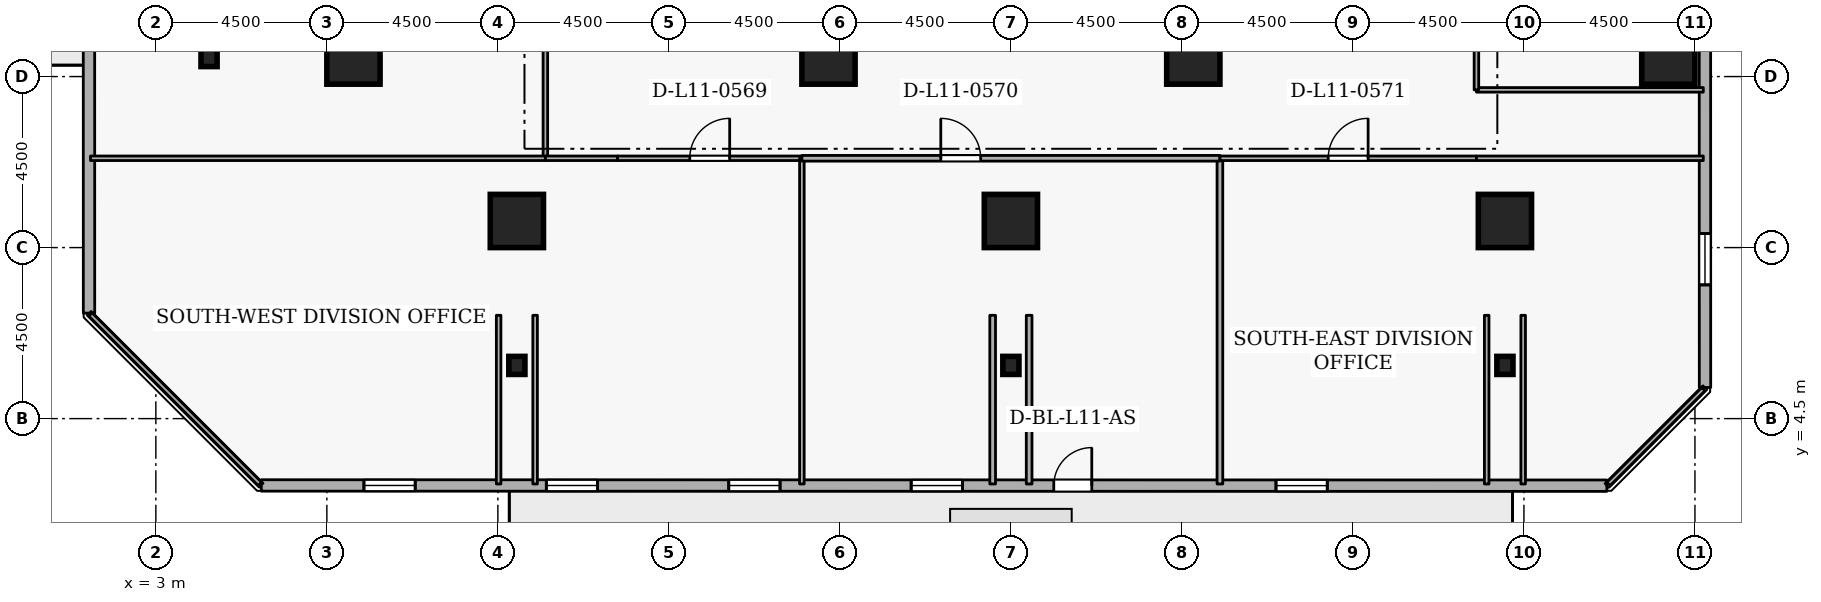
"""IFC4 building model, lengths in metres.
Left out: names, types, materials, properties, quantities, classifications, styles, units other than length and angle.
Written with IfcOpenShell. Run it as: python <this file> out.ifc"""

import sys

from ifc_helpers import new_model, si_unit, direction, frame, frame_2d, origin, origin_2d, place, context, subcontext, project, spatial, rectangle, i_section, extrude, element, fill, save


model = new_model("IFC4")
c1 = context("Model", 3, precision=1e-05, world=origin(), true_north=direction((0.0, 1.0)))
c2 = subcontext(c1, "Body", "Model", "MODEL_VIEW")
j1 = project(units=[si_unit("LENGTHUNIT", "METRE"), si_unit("PLANEANGLEUNIT", "RADIAN")], contexts=[c1])
p1 = place(None, origin())
s1 = spatial("IfcSite", under=j1, at=p1, CompositionType="ELEMENT")
p2 = place(p1, origin())
s2 = spatial("IfcBuilding", under=s1, at=p2, CompositionType="ELEMENT")
p3 = place(p2, frame((0.0, 0.0, 45.9)))
s3 = spatial("IfcBuildingStorey", under=s2, at=p3, CompositionType="ELEMENT", Elevation=45.9)
for number, where, z_axis, x_axis in (
    (1, (12.5, 9.7, 0.0), (0.0, 0.0, 1.0), (1.0, 0.0, 0.0)),
    (2, (25.5, 9.7, 0.0), (0.0, 0.0, 1.0), (1.0, 0.0, 0.0)),
    (3, (38.5, 9.7, 0.0), (0.0, 0.0, 1.0), (1.0, 0.0, 0.0)),
    (4, (42.8, 14.0, 0.0), (0.0, 0.0, 1.0), (1.0, 0.0, 0.0)),
    (5, (8.2, 14.0, 0.0), (0.0, 0.0, 1.0), (1.0, 0.0, 0.0)),
    (6, (20.7, 14.0, 0.0), (0.0, 0.0, 1.0), (1.0, 0.0, 0.0)),
    (7, (30.3, 14.0, 0.0), (0.0, 0.0, 1.0), (1.0, 0.0, 0.0)),
):
    element("IfcColumn", number, at=place(p3, frame(where, z_axis=z_axis, x_axis=x_axis)), inside=s3, PredefinedType="COLUMN", context=c2, shape_type="SweptSolid", body=[
        extrude(rectangle(XDim=1.4, YDim=1.4, at=origin_2d()), origin(), (0.0, 0.0, 1.0), 3.6),
    ])
for number, where, z_axis, x_axis in (
    (8, (12.5, 5.9, 0.0), (0.0, 0.0, 1.0), (1.0, 0.0, 0.0)),
    (9, (25.5, 5.9, 0.0), (0.0, 0.0, 1.0), (1.0, 0.0, 0.0)),
    (10, (38.5, 5.9, 0.0), (0.0, 0.0, 1.0), (1.0, 0.0, 0.0)),
    (11, (4.4, 14.0, 0.0), (0.0, 0.0, 1.0), (1.0, 0.0, 0.0)),
):
    element("IfcColumn", number, at=place(p3, frame(where, z_axis=z_axis, x_axis=x_axis)), inside=s3, PredefinedType="COLUMN", context=c2, shape_type="SweptSolid", body=[
        extrude(i_section(OverallWidth=0.424, OverallDepth=0.475, WebThickness=0.048, FlangeThickness=0.077, FilletRadius=0.015, at=origin_2d()), origin(), (0.0, 0.0, 1.0), 3.6),
    ])
p4 = place(p3, frame((5.775, 2.741, 0.0), z_axis=(0.0, 0.0, 1.0), x_axis=(0.999999983929, -0.00017928314, 0.0)))
e12 = element("IfcWall", 12, at=p4, inside=s3, PredefinedType="STANDARD", context=c2, shape_type="SweptSolid", body=[
    extrude(rectangle(XDim=35.406, YDim=0.3, at=frame_2d((17.703, 0.0))), origin(), (0.0, 0.0, 1.0), 2.22),
])
p5 = place(p4, frame((20.853, 0.0, 0.0)))
e13 = element("IfcOpeningElement", 13, at=p5, cuts=e12, PredefinedType="OPENING", context=c2, shape_type="SweptSolid", body=[
    extrude(rectangle(XDim=1.0, YDim=2.08, at=frame_2d((0.5, 1.04))), frame((0.0, 0.16, 0.0), z_axis=(0.0, -1.0, 0.0), x_axis=(1.0, 0.0, 0.0)), (0.0, 0.0, 1.0), 0.32),
])
p6 = place(p4, frame((2.7, 0.0, 0.72)))
e14 = element("IfcOpeningElement", 14, at=p6, cuts=e12, PredefinedType="OPENING", context=c2, shape_type="SweptSolid", body=[
    extrude(rectangle(XDim=1.35, YDim=1.05, at=frame_2d((0.675, 0.525))), frame((0.0, 0.16, 0.0), z_axis=(0.0, -1.0, 0.0), x_axis=(1.0, 0.0, 0.0)), (0.0, 0.0, 1.0), 0.32),
])
p7 = place(p4, frame((7.5, 0.0, 0.72)))
e15 = element("IfcOpeningElement", 15, at=p7, cuts=e12, PredefinedType="OPENING", context=c2, shape_type="SweptSolid", body=[
    extrude(rectangle(XDim=1.35, YDim=1.05, at=frame_2d((0.675, 0.525))), frame((0.0, 0.16, 0.0), z_axis=(0.0, -1.0, 0.0), x_axis=(1.0, 0.0, 0.0)), (0.0, 0.0, 1.0), 0.32),
])
p8 = place(p4, frame((12.3, 0.0, 0.72)))
e16 = element("IfcOpeningElement", 16, at=p8, cuts=e12, PredefinedType="OPENING", context=c2, shape_type="SweptSolid", body=[
    extrude(rectangle(XDim=1.35, YDim=1.05, at=frame_2d((0.675, 0.525))), frame((0.0, 0.16, 0.0), z_axis=(0.0, -1.0, 0.0), x_axis=(1.0, 0.0, 0.0)), (0.0, 0.0, 1.0), 0.32),
])
p9 = place(p4, frame((17.1, 0.0, 0.72)))
e17 = element("IfcOpeningElement", 17, at=p9, cuts=e12, PredefinedType="OPENING", context=c2, shape_type="SweptSolid", body=[
    extrude(rectangle(XDim=1.35, YDim=1.05, at=frame_2d((0.675, 0.525))), frame((0.0, 0.16, 0.0), z_axis=(0.0, -1.0, 0.0), x_axis=(1.0, 0.0, 0.0)), (0.0, 0.0, 1.0), 0.32),
])
p10 = place(p4, frame((26.7, 0.0, 0.72)))
e18 = element("IfcOpeningElement", 18, at=p10, cuts=e12, PredefinedType="OPENING", context=c2, shape_type="SweptSolid", body=[
    extrude(rectangle(XDim=1.35, YDim=1.05, at=frame_2d((0.675, 0.525))), frame((0.0, 0.16, 0.0), z_axis=(0.0, -1.0, 0.0), x_axis=(1.0, 0.0, 0.0)), (0.0, 0.0, 1.0), 0.32),
])
p11 = place(p3, frame((43.765, 5.319, 0.0), z_axis=(0.0, 0.0, 1.0), x_axis=(-0.00017928314, 0.999999983929, 0.0)))
e19 = element("IfcWall", 19, at=p11, inside=s3, PredefinedType="STANDARD", context=c2, shape_type="SweptSolid", body=[
    extrude(rectangle(XDim=35.406, YDim=0.3, at=frame_2d((17.703, 0.0))), origin(), (0.0, 0.0, 1.0), 2.22),
])
p12 = place(p11, frame((2.7, 0.0, 0.72)))
e20 = element("IfcOpeningElement", 20, at=p12, cuts=e19, PredefinedType="OPENING", context=c2, shape_type="SweptSolid", body=[
    extrude(rectangle(XDim=1.35, YDim=1.05, at=frame_2d((0.675, 0.525))), frame((0.0, 0.16, 0.0), z_axis=(0.0, -1.0, 0.0), x_axis=(1.0, 0.0, 0.0)), (0.0, 0.0, 1.0), 0.32),
])
p13 = place(p11, frame((12.3, 0.0, 0.72)))
e21 = element("IfcOpeningElement", 21, at=p13, cuts=e19, PredefinedType="OPENING", context=c2, shape_type="SweptSolid", body=[
    extrude(rectangle(XDim=1.35, YDim=1.05, at=frame_2d((0.675, 0.525))), frame((0.0, 0.16, 0.0), z_axis=(0.0, -1.0, 0.0), x_axis=(1.0, 0.0, 0.0)), (0.0, 0.0, 1.0), 0.32),
])
p14 = place(p11, frame((17.1, 0.0, 0.72)))
e22 = element("IfcOpeningElement", 22, at=p14, cuts=e19, PredefinedType="OPENING", context=c2, shape_type="SweptSolid", body=[
    extrude(rectangle(XDim=1.35, YDim=1.05, at=frame_2d((0.675, 0.525))), frame((0.0, 0.16, 0.0), z_axis=(0.0, -1.0, 0.0), x_axis=(1.0, 0.0, 0.0)), (0.0, 0.0, 1.0), 0.32),
])
p15 = place(p11, frame((26.7, 0.0, 0.72)))
e23 = element("IfcOpeningElement", 23, at=p15, cuts=e19, PredefinedType="OPENING", context=c2, shape_type="SweptSolid", body=[
    extrude(rectangle(XDim=1.35, YDim=1.05, at=frame_2d((0.675, 0.525))), frame((0.0, 0.16, 0.0), z_axis=(0.0, -1.0, 0.0), x_axis=(1.0, 0.0, 0.0)), (0.0, 0.0, 1.0), 0.32),
])
p16 = place(p11, frame((31.5, 0.0, 0.72)))
e24 = element("IfcOpeningElement", 24, at=p16, cuts=e19, PredefinedType="OPENING", context=c2, shape_type="SweptSolid", body=[
    extrude(rectangle(XDim=1.35, YDim=1.05, at=frame_2d((0.675, 0.525))), frame((0.0, 0.16, 0.0), z_axis=(0.0, -1.0, 0.0), x_axis=(1.0, 0.0, 0.0)), (0.0, 0.0, 1.0), 0.32),
])
p17 = place(p3, frame((1.235, 42.681, 0.0), z_axis=(0.0, 0.0, 1.0), x_axis=(0.00017928314, -0.999999983929, 0.0)))
e25 = element("IfcWall", 25, at=p17, inside=s3, PredefinedType="STANDARD", context=c2, shape_type="SweptSolid", body=[
    extrude(rectangle(XDim=35.406, YDim=0.3, at=frame_2d((17.703, 0.0))), origin(), (0.0, 0.0, 1.0), 2.22),
])
p18 = place(p17, frame((19.503, 0.0, 0.0)))
e26 = element("IfcOpeningElement", 26, at=p18, cuts=e25, PredefinedType="OPENING", context=c2, shape_type="SweptSolid", body=[
    extrude(rectangle(XDim=1.0, YDim=2.08, at=frame_2d((0.5, 1.04))), frame((0.0, 0.16, 0.0), z_axis=(0.0, -1.0, 0.0), x_axis=(1.0, 0.0, 0.0)), (0.0, 0.0, 1.0), 0.32),
])
p19 = place(p17, frame((2.7, 0.0, 0.72)))
e27 = element("IfcOpeningElement", 27, at=p19, cuts=e25, PredefinedType="OPENING", context=c2, shape_type="SweptSolid", body=[
    extrude(rectangle(XDim=1.35, YDim=1.05, at=frame_2d((0.675, 0.525))), frame((0.0, 0.16, 0.0), z_axis=(0.0, -1.0, 0.0), x_axis=(1.0, 0.0, 0.0)), (0.0, 0.0, 1.0), 0.32),
])
p20 = place(p17, frame((7.5, 0.0, 0.72)))
e28 = element("IfcOpeningElement", 28, at=p20, cuts=e25, PredefinedType="OPENING", context=c2, shape_type="SweptSolid", body=[
    extrude(rectangle(XDim=1.35, YDim=1.05, at=frame_2d((0.675, 0.525))), frame((0.0, 0.16, 0.0), z_axis=(0.0, -1.0, 0.0), x_axis=(1.0, 0.0, 0.0)), (0.0, 0.0, 1.0), 0.32),
])
p21 = place(p17, frame((17.1, 0.0, 0.72)))
e29 = element("IfcOpeningElement", 29, at=p21, cuts=e25, PredefinedType="OPENING", context=c2, shape_type="SweptSolid", body=[
    extrude(rectangle(XDim=1.35, YDim=1.05, at=frame_2d((0.675, 0.525))), frame((0.0, 0.16, 0.0), z_axis=(0.0, -1.0, 0.0), x_axis=(1.0, 0.0, 0.0)), (0.0, 0.0, 1.0), 0.32),
])
p22 = place(p17, frame((21.9, 0.0, 0.72)))
e30 = element("IfcOpeningElement", 30, at=p22, cuts=e25, PredefinedType="OPENING", context=c2, shape_type="SweptSolid", body=[
    extrude(rectangle(XDim=1.35, YDim=1.05, at=frame_2d((0.675, 0.525))), frame((0.0, 0.16, 0.0), z_axis=(0.0, -1.0, 0.0), x_axis=(1.0, 0.0, 0.0)), (0.0, 0.0, 1.0), 0.32),
])
p23 = place(p17, frame((26.7, 0.0, 0.72)))
e31 = element("IfcOpeningElement", 31, at=p23, cuts=e25, PredefinedType="OPENING", context=c2, shape_type="SweptSolid", body=[
    extrude(rectangle(XDim=1.35, YDim=1.05, at=frame_2d((0.675, 0.525))), frame((0.0, 0.16, 0.0), z_axis=(0.0, -1.0, 0.0), x_axis=(1.0, 0.0, 0.0)), (0.0, 0.0, 1.0), 0.32),
])
p24 = place(p3, frame((13.25, 20.7, 0.0), z_axis=(0.0, 0.0, 1.0), x_axis=(0.0, -1.0, 0.0)))
e32 = element("IfcWall", 32, at=p24, inside=s3, PredefinedType="PARTITIONING", context=c2, shape_type="SweptSolid", body=[
    extrude(rectangle(XDim=9.35, YDim=0.12, at=frame_2d((4.675, 0.0))), origin(), (0.0, 0.0, 1.0), 3.26),
])
p25 = place(p24, frame((4.15, 0.0, 0.0)))
e33 = element("IfcOpeningElement", 33, at=p25, cuts=e32, PredefinedType="OPENING", context=c2, shape_type="SweptSolid", body=[
    extrude(rectangle(XDim=1.05, YDim=2.1, at=frame_2d((0.525, 1.05))), frame((0.0, 0.07, 0.0), z_axis=(0.0, -1.0, 0.0), x_axis=(1.0, 0.0, 0.0)), (0.0, 0.0, 1.0), 0.14),
])
p26 = place(p3, frame((13.25, 11.35, 0.0), z_axis=(0.0, 0.0, 1.0), x_axis=(-1.0, 0.0, 0.0)))
e34 = element("IfcWall", 34, at=p26, inside=s3, PredefinedType="PARTITIONING", context=c2, shape_type="SweptSolid", body=[
    extrude(rectangle(XDim=11.97, YDim=0.12, at=frame_2d((5.985, 0.0))), origin(), (0.0, 0.0, 1.0), 3.26),
])
p27 = place(p3, frame((43.72, 13.15, 0.0), z_axis=(0.0, 0.0, 1.0), x_axis=(-1.0, 0.0, 0.0)))
e35 = element("IfcWall", 35, at=p27, inside=s3, PredefinedType="PARTITIONING", context=c2, shape_type="SweptSolid", body=[
    extrude(rectangle(XDim=5.97, YDim=0.12, at=frame_2d((2.985, 0.0))), origin(), (0.0, 0.0, 1.0), 3.26),
])
p28 = place(p3, frame((37.75, 13.15, 0.0), z_axis=(0.0, 0.0, 1.0), x_axis=(0.0, 1.0, 0.0)))
e36 = element("IfcWall", 36, at=p28, inside=s3, PredefinedType="PARTITIONING", context=c2, shape_type="SweptSolid", body=[
    extrude(rectangle(XDim=1.862, YDim=0.12, at=frame_2d((0.931, 0.0))), origin(), (0.0, 0.0, 1.0), 3.26),
])
for number, where, z_axis, x_axis in (
    (37, (12.98, 2.78, 0.0), (0.0, 0.0, 1.0), (0.0, 1.0, 0.0)),
    (38, (12.02, 7.219, 0.0), (0.0, 0.0, 1.0), (0.0, -1.0, 0.0)),
):
    element("IfcWall", number, at=place(p3, frame(where, z_axis=z_axis, x_axis=x_axis)), inside=s3, PredefinedType="PARTITIONING", context=c2, shape_type="SweptSolid", body=[
        extrude(rectangle(XDim=4.438, YDim=0.12, at=frame_2d((2.219, 0.0))), origin(), (0.0, 0.0, 1.0), 1.685),
    ])
p29 = place(p3, frame((5.739, 2.78, 0.0), z_axis=(0.0, 0.0, 1.0), x_axis=(-0.707106781187, 0.707106781187, 0.0)))
e39 = element("IfcWall", 39, at=p29, inside=s3, PredefinedType="PARTITIONING", context=c2, shape_type="SweptSolid", body=[
    extrude(rectangle(XDim=6.305, YDim=0.12, at=frame_2d((3.153, 0.0))), origin(), (0.0, 0.0, 1.0), 3.26),
])
p30 = place(p3, frame((13.25, 11.35, 0.0), z_axis=(0.0, 0.0, 1.0), x_axis=(1.0, 0.0, 0.0)))
e40 = element("IfcWall", 40, at=p30, inside=s3, PredefinedType="PARTITIONING", context=c2, shape_type="SweptSolid", body=[
    extrude(rectangle(XDim=1.9, YDim=0.12, at=frame_2d((0.95, 0.0))), origin(), (0.0, 0.0, 1.0), 3.26),
])
p31 = place(p3, frame((15.15, 11.35, 0.0), z_axis=(0.0, 0.0, 1.0), x_axis=(1.0, 0.0, 0.0)))
e41 = element("IfcWall", 41, at=p31, inside=s3, PredefinedType="PARTITIONING", context=c2, shape_type="SweptSolid", body=[
    extrude(rectangle(XDim=4.85, YDim=0.12, at=frame_2d((2.425, 0.0))), origin(), (0.0, 0.0, 1.0), 3.26),
])
p32 = place(p31, frame((1.9, 0.0, 0.0)))
e42 = element("IfcOpeningElement", 42, at=p32, cuts=e41, PredefinedType="OPENING", context=c2, shape_type="SweptSolid", body=[
    extrude(rectangle(XDim=1.05, YDim=2.1, at=frame_2d((0.525, 1.05))), frame((0.0, 0.07, 0.0), z_axis=(0.0, -1.0, 0.0), x_axis=(1.0, 0.0, 0.0)), (0.0, 0.0, 1.0), 0.14),
])
p33 = place(p3, frame((20.0, 11.35, 0.0), z_axis=(0.0, 0.0, 1.0), x_axis=(0.0, -1.0, 0.0)))
e43 = element("IfcWall", 43, at=p33, inside=s3, PredefinedType="PARTITIONING", context=c2, shape_type="SweptSolid", body=[
    extrude(rectangle(XDim=8.57, YDim=0.12, at=frame_2d((4.285, 0.0))), origin(), (0.0, 0.0, 1.0), 3.26),
])
p34 = place(p3, frame((31.0, 11.35, 0.0), z_axis=(0.0, 0.0, 1.0), x_axis=(0.0, -1.0, 0.0)))
e44 = element("IfcWall", 44, at=p34, inside=s3, PredefinedType="PARTITIONING", context=c2, shape_type="SweptSolid", body=[
    extrude(rectangle(XDim=8.57, YDim=0.15, at=frame_2d((4.285, 0.0))), origin(), (0.0, 0.0, 1.0), 3.26),
])
for number, where, z_axis, x_axis in (
    (45, (25.98, 2.78, 0.0), (0.0, 0.0, 1.0), (0.0, 1.0, 0.0)),
    (46, (25.02, 7.219, 0.0), (0.0, 0.0, 1.0), (0.0, -1.0, 0.0)),
):
    element("IfcWall", number, at=place(p3, frame(where, z_axis=z_axis, x_axis=x_axis)), inside=s3, PredefinedType="PARTITIONING", context=c2, shape_type="SweptSolid", body=[
        extrude(rectangle(XDim=4.438, YDim=0.15, at=frame_2d((2.219, 0.0))), origin(), (0.0, 0.0, 1.0), 1.685),
    ])
p35 = place(p3, frame((20.0, 11.35, 0.0), z_axis=(0.0, 0.0, 1.0), x_axis=(1.0, 0.0, 0.0)))
e47 = element("IfcWall", 47, at=p35, inside=s3, PredefinedType="PARTITIONING", context=c2, shape_type="SweptSolid", body=[
    extrude(rectangle(XDim=11.0, YDim=0.15, at=frame_2d((5.5, 0.0))), origin(), (0.0, 0.0, 1.0), 3.26),
])
p36 = place(p35, frame((3.655, 0.0, 0.0)))
e48 = element("IfcOpeningElement", 48, at=p36, cuts=e47, PredefinedType="OPENING", context=c2, shape_type="SweptSolid", body=[
    extrude(rectangle(XDim=1.05, YDim=2.1, at=frame_2d((0.525, 1.05))), frame((0.0, 0.085, 0.0), z_axis=(0.0, -1.0, 0.0), x_axis=(1.0, 0.0, 0.0)), (0.0, 0.0, 1.0), 0.17),
])
for number, where, z_axis, x_axis in (
    (49, (38.98, 2.78, 0.0), (0.0, 0.0, 1.0), (0.0, 1.0, 0.0)),
    (50, (38.02, 7.219, 0.0), (0.0, 0.0, 1.0), (0.0, -1.0, 0.0)),
):
    element("IfcWall", number, at=place(p3, frame(where, z_axis=z_axis, x_axis=x_axis)), inside=s3, PredefinedType="PARTITIONING", context=c2, shape_type="SweptSolid", body=[
        extrude(rectangle(XDim=4.438, YDim=0.12, at=frame_2d((2.219, 0.0))), origin(), (0.0, 0.0, 1.0), 1.685),
    ])
p37 = place(p3, frame((31.0, 11.35, 0.0), z_axis=(0.0, 0.0, 1.0), x_axis=(1.0, 0.0, 0.0)))
e51 = element("IfcWall", 51, at=p37, inside=s3, PredefinedType="PARTITIONING", context=c2, shape_type="SweptSolid", body=[
    extrude(rectangle(XDim=6.75, YDim=0.12, at=frame_2d((3.375, 0.0))), origin(), (0.0, 0.0, 1.0), 3.26),
])
p38 = place(p37, frame((2.85, 0.0, 0.0)))
e52 = element("IfcOpeningElement", 52, at=p38, cuts=e51, PredefinedType="OPENING", context=c2, shape_type="SweptSolid", body=[
    extrude(rectangle(XDim=1.05, YDim=2.1, at=frame_2d((0.525, 1.05))), frame((0.0, 0.07, 0.0), z_axis=(0.0, -1.0, 0.0), x_axis=(1.0, 0.0, 0.0)), (0.0, 0.0, 1.0), 0.14),
])
p39 = place(p3, frame((37.75, 11.35, 0.0), z_axis=(0.0, 0.0, 1.0), x_axis=(1.0, 0.0, 0.0)))
e53 = element("IfcWall", 53, at=p39, inside=s3, PredefinedType="PARTITIONING", context=c2, shape_type="SweptSolid", body=[
    extrude(rectangle(XDim=5.97, YDim=0.12, at=frame_2d((2.985, 0.0))), origin(), (0.0, 0.0, 1.0), 3.26),
])
p40 = place(p3, frame((43.72, 5.275, 0.0), z_axis=(0.0, 0.0, 1.0), x_axis=(-0.707106781187, -0.707106781187, 0.0)))
e54 = element("IfcWall", 54, at=p40, inside=s3, PredefinedType="PARTITIONING", context=c2, shape_type="SweptSolid", body=[
    extrude(rectangle(XDim=3.528, YDim=0.12, at=frame_2d((1.764, 0.0))), origin(), (0.0, 0.0, 1.0), 3.26),
])
p41 = place(p5, origin())
e55 = element("IfcDoor", 55, at=p41, inside=s3, OperationType="SINGLE_SWING_RIGHT", PredefinedType="DOOR", context=c2, shape_type="SweptSolid", body=[
    extrude(rectangle(XDim=1.0, YDim=2.08, at=frame_2d((0.5, 1.04))), frame((0.0, 0.025, 0.0), z_axis=(0.0, -1.0, 0.0), x_axis=(1.0, 0.0, 0.0)), (0.0, 0.0, 1.0), 0.05),
])
fill(e13, e55)
p42 = place(p6, origin())
e56 = element("IfcWindow", 56, at=p42, inside=s3, PartitioningType="SINGLE_PANEL", PredefinedType="WINDOW", context=c2, shape_type="SweptSolid", body=[
    extrude(rectangle(XDim=1.35, YDim=1.05, at=frame_2d((0.675, 0.525))), frame((0.0, 0.03, 0.0), z_axis=(0.0, -1.0, 0.0), x_axis=(1.0, 0.0, 0.0)), (0.0, 0.0, 1.0), 0.06),
])
fill(e14, e56)
p43 = place(p7, origin())
e57 = element("IfcWindow", 57, at=p43, inside=s3, PartitioningType="SINGLE_PANEL", PredefinedType="WINDOW", context=c2, shape_type="SweptSolid", body=[
    extrude(rectangle(XDim=1.35, YDim=1.05, at=frame_2d((0.675, 0.525))), frame((0.0, 0.03, 0.0), z_axis=(0.0, -1.0, 0.0), x_axis=(1.0, 0.0, 0.0)), (0.0, 0.0, 1.0), 0.06),
])
fill(e15, e57)
p44 = place(p8, origin())
e58 = element("IfcWindow", 58, at=p44, inside=s3, PartitioningType="SINGLE_PANEL", PredefinedType="WINDOW", context=c2, shape_type="SweptSolid", body=[
    extrude(rectangle(XDim=1.35, YDim=1.05, at=frame_2d((0.675, 0.525))), frame((0.0, 0.03, 0.0), z_axis=(0.0, -1.0, 0.0), x_axis=(1.0, 0.0, 0.0)), (0.0, 0.0, 1.0), 0.06),
])
fill(e16, e58)
p45 = place(p9, origin())
e59 = element("IfcWindow", 59, at=p45, inside=s3, PartitioningType="SINGLE_PANEL", PredefinedType="WINDOW", context=c2, shape_type="SweptSolid", body=[
    extrude(rectangle(XDim=1.35, YDim=1.05, at=frame_2d((0.675, 0.525))), frame((0.0, 0.03, 0.0), z_axis=(0.0, -1.0, 0.0), x_axis=(1.0, 0.0, 0.0)), (0.0, 0.0, 1.0), 0.06),
])
fill(e17, e59)
p46 = place(p10, origin())
e60 = element("IfcWindow", 60, at=p46, inside=s3, PartitioningType="SINGLE_PANEL", PredefinedType="WINDOW", context=c2, shape_type="SweptSolid", body=[
    extrude(rectangle(XDim=1.35, YDim=1.05, at=frame_2d((0.675, 0.525))), frame((0.0, 0.03, 0.0), z_axis=(0.0, -1.0, 0.0), x_axis=(1.0, 0.0, 0.0)), (0.0, 0.0, 1.0), 0.06),
])
fill(e18, e60)
p47 = place(p12, origin())
e61 = element("IfcWindow", 61, at=p47, inside=s3, PartitioningType="SINGLE_PANEL", PredefinedType="WINDOW", context=c2, shape_type="SweptSolid", body=[
    extrude(rectangle(XDim=1.35, YDim=1.05, at=frame_2d((0.675, 0.525))), frame((0.0, 0.03, 0.0), z_axis=(0.0, -1.0, 0.0), x_axis=(1.0, 0.0, 0.0)), (0.0, 0.0, 1.0), 0.06),
])
fill(e20, e61)
p48 = place(p32, origin())
e62 = element("IfcDoor", 62, at=p48, inside=s3, OperationType="SINGLE_SWING_RIGHT", PredefinedType="DOOR", context=c2, shape_type="SweptSolid", body=[
    extrude(rectangle(XDim=1.05, YDim=2.1, at=frame_2d((0.525, 1.05))), frame((0.0, 0.025, 0.0), z_axis=(0.0, -1.0, 0.0), x_axis=(1.0, 0.0, 0.0)), (0.0, 0.0, 1.0), 0.05),
])
fill(e42, e62)
p49 = place(p36, origin())
e63 = element("IfcDoor", 63, at=p49, inside=s3, OperationType="SINGLE_SWING_LEFT", PredefinedType="DOOR", context=c2, shape_type="SweptSolid", body=[
    extrude(rectangle(XDim=1.05, YDim=2.1, at=frame_2d((0.525, 1.05))), frame((0.0, 0.025, 0.0), z_axis=(0.0, -1.0, 0.0), x_axis=(1.0, 0.0, 0.0)), (0.0, 0.0, 1.0), 0.05),
])
fill(e48, e63)
p50 = place(p38, origin())
e64 = element("IfcDoor", 64, at=p50, inside=s3, OperationType="SINGLE_SWING_RIGHT", PredefinedType="DOOR", context=c2, shape_type="SweptSolid", body=[
    extrude(rectangle(XDim=1.05, YDim=2.1, at=frame_2d((0.525, 1.05))), frame((0.0, 0.025, 0.0), z_axis=(0.0, -1.0, 0.0), x_axis=(1.0, 0.0, 0.0)), (0.0, 0.0, 1.0), 0.05),
])
fill(e52, e64)
save(model, sys.argv[1])
